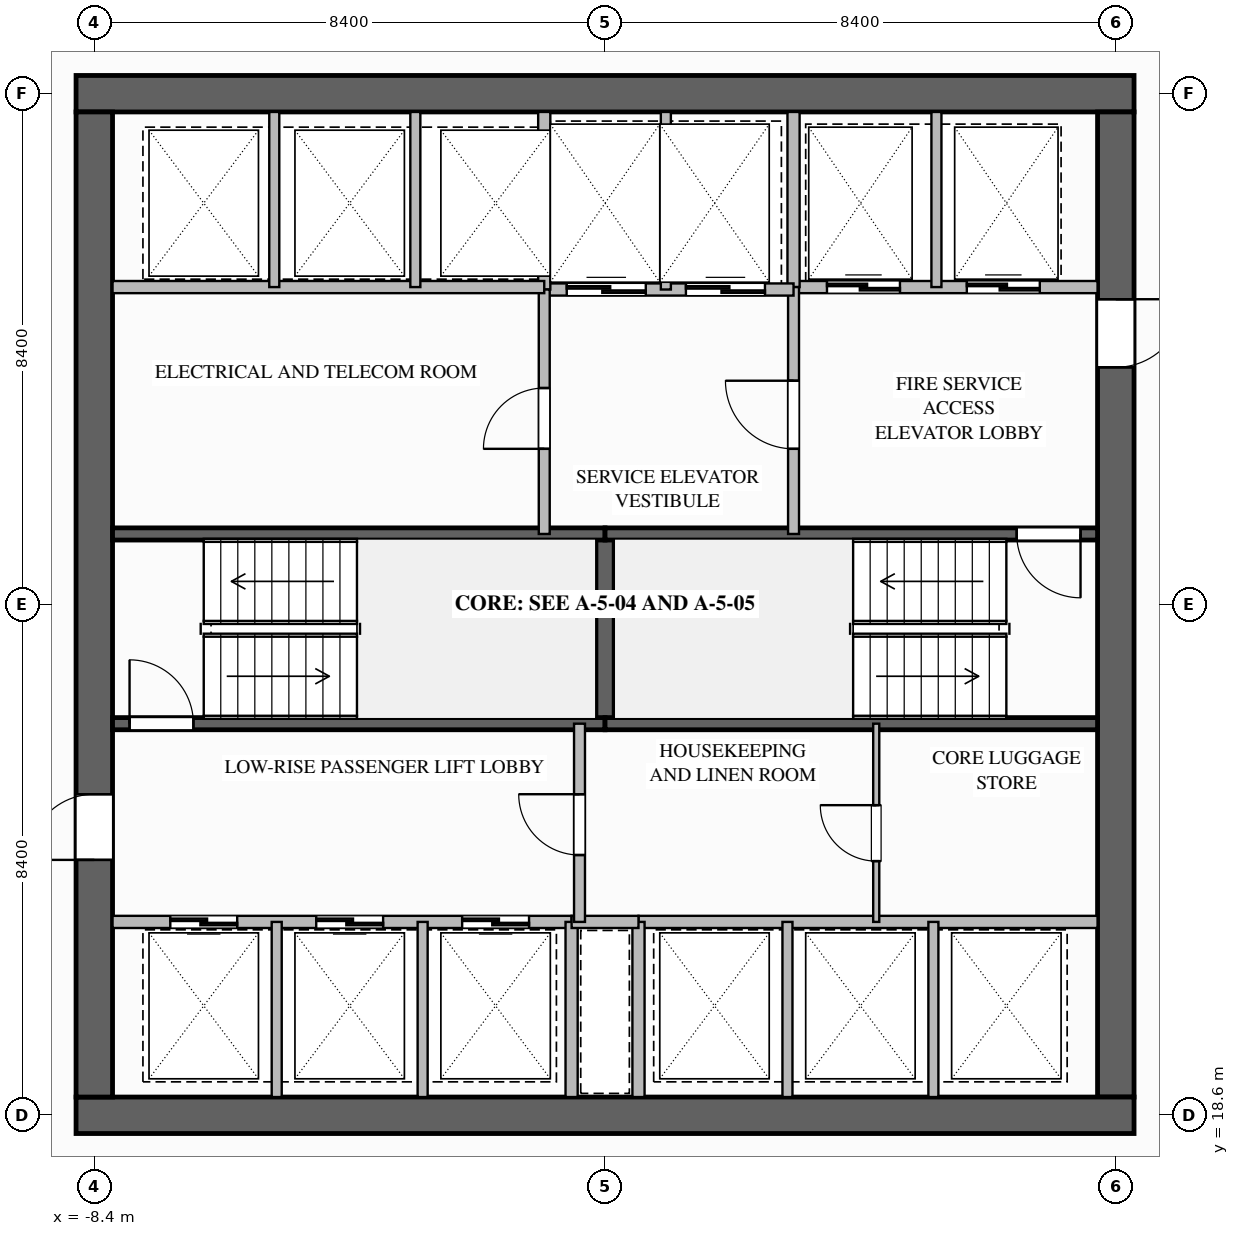
"""IFC4 building model, lengths in metres.
Left out: names, types, materials, properties, quantities, classifications, styles, units other than length and angle.
Written with IfcOpenShell. Run it as: python <this file> out.ifc"""

import sys

from ifc_helpers import new_model, si_unit, direction, frame, frame_2d, origin, place, context, subcontext, project, spatial, rectangle, extrude, element, fill, save


model = new_model("IFC4")
c1 = context("Model", 3, precision=1e-05, world=origin(), true_north=direction((0.0, 1.0)))
c2 = subcontext(c1, "Body", "Model", "MODEL_VIEW")
j1 = project(units=[si_unit("LENGTHUNIT", "METRE"), si_unit("PLANEANGLEUNIT", "RADIAN")], contexts=[c1])
p1 = place(None, origin())
s1 = spatial("IfcSite", under=j1, at=p1, CompositionType="ELEMENT")
p2 = place(p1, origin())
s2 = spatial("IfcBuilding", under=s1, at=p2, CompositionType="ELEMENT")
p3 = place(p2, frame((0.0, 0.0, 75.2)))
s3 = spatial("IfcBuildingStorey", under=s2, at=p3, CompositionType="ELEMENT", Elevation=75.2)
p4 = place(p3, frame((-8.7, 35.4, 0.0), z_axis=(0.0, 0.0, 1.0), x_axis=(1.0, 0.0, 0.0)))
e1 = element("IfcWall", 1, at=p4, inside=s3, PredefinedType="SHEAR", context=c2, shape_type="SweptSolid", body=[
    extrude(rectangle(XDim=17.4, YDim=0.6, at=frame_2d((8.7, 0.0))), origin(), (0.0, 0.0, 1.0), 3.5),
])
p5 = place(p3, frame((8.4, 35.1, 0.0), z_axis=(0.0, 0.0, 1.0), x_axis=(0.0, -1.0, 0.0)))
e2 = element("IfcWall", 2, at=p5, inside=s3, PredefinedType="SHEAR", context=c2, shape_type="SweptSolid", body=[
    extrude(rectangle(XDim=16.2, YDim=0.6, at=frame_2d((8.1, 0.0))), origin(), (0.0, 0.0, 1.0), 3.5),
])
p6 = place(p5, frame((3.08, 0.0, 0.0)))
e3 = element("IfcOpeningElement", 3, at=p6, cuts=e2, PredefinedType="OPENING", context=c2, shape_type="SweptSolid", body=[
    extrude(rectangle(XDim=1.12, YDim=2.1, at=frame_2d((0.56, 1.05))), frame((0.0, 0.31, 0.0), z_axis=(0.0, -1.0, 0.0), x_axis=(1.0, 0.0, 0.0)), (0.0, 0.0, 1.0), 0.62),
])
p7 = place(p3, frame((8.7, 18.6, 0.0), z_axis=(0.0, 0.0, 1.0), x_axis=(-1.0, 0.0, 0.0)))
e4 = element("IfcWall", 4, at=p7, inside=s3, PredefinedType="SHEAR", context=c2, shape_type="SweptSolid", body=[
    extrude(rectangle(XDim=17.4, YDim=0.6, at=frame_2d((8.7, 0.0))), origin(), (0.0, 0.0, 1.0), 3.5),
])
p8 = place(p3, frame((-8.4, 18.9, 0.0), z_axis=(0.0, 0.0, 1.0), x_axis=(0.0, 1.0, 0.0)))
e5 = element("IfcWall", 5, at=p8, inside=s3, PredefinedType="SHEAR", context=c2, shape_type="SweptSolid", body=[
    extrude(rectangle(XDim=16.2, YDim=0.6, at=frame_2d((8.1, 0.0))), origin(), (0.0, 0.0, 1.0), 3.5),
])
p9 = place(p8, frame((3.9, 0.0, 0.0)))
e6 = element("IfcOpeningElement", 6, at=p9, cuts=e5, PredefinedType="OPENING", context=c2, shape_type="SweptSolid", body=[
    extrude(rectangle(XDim=1.08, YDim=2.04, at=frame_2d((0.54, 1.02))), frame((0.0, 0.31, 0.0), z_axis=(0.0, -1.0, 0.0), x_axis=(1.0, 0.0, 0.0)), (0.0, 0.0, 1.0), 0.62),
])
p10 = place(p3, frame((0.0, 25.04, 0.0), z_axis=(0.0, 0.0, 1.0), x_axis=(0.0, 1.0, 0.0)))
e7 = element("IfcWall", 7, at=p10, inside=s3, PredefinedType="SOLIDWALL", context=c2, shape_type="SweptSolid", body=[
    extrude(rectangle(XDim=3.12, YDim=0.3, at=frame_2d((1.56, 0.0))), origin(), (0.0, 0.0, 1.0), 3.24),
])
p11 = place(p3, frame((-8.1, 25.04, 0.0), z_axis=(0.0, 0.0, 1.0), x_axis=(1.0, 0.0, 0.0)))
e8 = element("IfcWall", 8, at=p11, inside=s3, PredefinedType="SOLIDWALL", context=c2, shape_type="SweptSolid", body=[
    extrude(rectangle(XDim=8.1, YDim=0.2, at=frame_2d((4.05, 0.0))), origin(), (0.0, 0.0, 1.0), 3.24),
])
p12 = place(p11, frame((0.28, 0.0, 0.0)))
e9 = element("IfcOpeningElement", 9, at=p12, cuts=e8, PredefinedType="OPENING", context=c2, shape_type="SweptSolid", body=[
    extrude(rectangle(XDim=1.05, YDim=2.1, at=frame_2d((0.525, 1.05))), frame((0.0, 0.11, 0.0), z_axis=(0.0, -1.0, 0.0), x_axis=(1.0, 0.0, 0.0)), (0.0, 0.0, 1.0), 0.22),
])
for number, where, z_axis, x_axis in (
    (10, (-8.1, 28.16, 0.0), (0.0, 0.0, 1.0), (1.0, 0.0, 0.0)),
    (11, (0.0, 25.04, 0.0), (0.0, 0.0, 1.0), (1.0, 0.0, 0.0)),
):
    element("IfcWall", number, at=place(p3, frame(where, z_axis=z_axis, x_axis=x_axis)), inside=s3, PredefinedType="SOLIDWALL", context=c2, shape_type="SweptSolid", body=[
        extrude(rectangle(XDim=8.1, YDim=0.2, at=frame_2d((4.05, 0.0))), origin(), (0.0, 0.0, 1.0), 3.24),
    ])
p13 = place(p3, frame((8.1, 28.16, 0.0), z_axis=(0.0, 0.0, 1.0), x_axis=(-1.0, 0.0, 0.0)))
e12 = element("IfcWall", 12, at=p13, inside=s3, PredefinedType="SOLIDWALL", context=c2, shape_type="SweptSolid", body=[
    extrude(rectangle(XDim=8.1, YDim=0.2, at=frame_2d((4.05, 0.0))), origin(), (0.0, 0.0, 1.0), 3.24),
])
p14 = place(p13, frame((0.28, 0.0, 0.0)))
e13 = element("IfcOpeningElement", 13, at=p14, cuts=e12, PredefinedType="OPENING", context=c2, shape_type="SweptSolid", body=[
    extrude(rectangle(XDim=1.05, YDim=2.1, at=frame_2d((0.525, 1.05))), frame((0.0, 0.11, 0.0), z_axis=(0.0, -1.0, 0.0), x_axis=(1.0, 0.0, 0.0)), (0.0, 0.0, 1.0), 0.22),
])
p15 = place(p3, frame((3.1, 32.22, 0.0), z_axis=(0.0, 0.0, 1.0), x_axis=(1.0, 0.0, 0.0)))
e14 = element("IfcWall", 14, at=p15, inside=s3, PredefinedType="SOLIDWALL", context=c2, shape_type="SweptSolid", body=[
    extrude(rectangle(XDim=5.0, YDim=0.2, at=frame_2d((2.5, 0.0))), origin(), (0.0, 0.0, 1.0), 3.24),
])
p16 = place(p15, frame((0.55, 0.0, 0.0)))
e15 = element("IfcOpeningElement", 15, at=p16, cuts=e14, PredefinedType="OPENING", context=c2, shape_type="SweptSolid", body=[
    extrude(rectangle(XDim=1.2, YDim=2.2, at=frame_2d((0.6, 1.1))), frame((0.0, 0.11, 0.0), z_axis=(0.0, -1.0, 0.0), x_axis=(1.0, 0.0, 0.0)), (0.0, 0.0, 1.0), 0.22),
])
p17 = place(p15, frame((2.85, 0.0, 0.0)))
e16 = element("IfcOpeningElement", 16, at=p17, cuts=e14, PredefinedType="OPENING", context=c2, shape_type="SweptSolid", body=[
    extrude(rectangle(XDim=1.2, YDim=2.2, at=frame_2d((0.6, 1.1))), frame((0.0, 0.11, 0.0), z_axis=(0.0, -1.0, 0.0), x_axis=(1.0, 0.0, 0.0)), (0.0, 0.0, 1.0), 0.22),
])
p18 = place(p3, frame((3.1, 32.22, 0.0), z_axis=(0.0, 0.0, 1.0), x_axis=(0.0, 1.0, 0.0)))
e17 = element("IfcWall", 17, at=p18, inside=s3, PredefinedType="SOLIDWALL", context=c2, shape_type="SweptSolid", body=[
    extrude(rectangle(XDim=2.88, YDim=0.2, at=frame_2d((1.44, 0.0))), origin(), (0.0, 0.0, 1.0), 3.24),
])
p19 = place(p3, frame((5.45, 32.22, 0.0), z_axis=(0.0, 0.0, 1.0), x_axis=(0.0, 1.0, 0.0)))
e18 = element("IfcWall", 18, at=p19, inside=s3, PredefinedType="PARTITIONING", context=c2, shape_type="SweptSolid", body=[
    extrude(rectangle(XDim=2.88, YDim=0.165, at=frame_2d((1.44, 0.0))), origin(), (0.0, 0.0, 1.0), 3.24),
])
p20 = place(p3, frame((3.1, 28.16, 0.0), z_axis=(0.0, 0.0, 1.0), x_axis=(0.0, 1.0, 0.0)))
e19 = element("IfcWall", 19, at=p20, inside=s3, PredefinedType="SOLIDWALL", context=c2, shape_type="SweptSolid", body=[
    extrude(rectangle(XDim=4.06, YDim=0.18, at=frame_2d((2.03, 0.0))), origin(), (0.0, 0.0, 1.0), 3.24),
])
p21 = place(p20, frame((1.4, 0.0, 0.0)))
e20 = element("IfcOpeningElement", 20, at=p21, cuts=e19, PredefinedType="OPENING", context=c2, shape_type="SweptSolid", body=[
    extrude(rectangle(XDim=1.12, YDim=2.1, at=frame_2d((0.56, 1.05))), frame((0.0, 0.1, 0.0), z_axis=(0.0, -1.0, 0.0), x_axis=(1.0, 0.0, 0.0)), (0.0, 0.0, 1.0), 0.2),
])
p22 = place(p3, frame((-1.0, 32.18, 0.0), z_axis=(0.0, 0.0, 1.0), x_axis=(1.0, 0.0, 0.0)))
e21 = element("IfcWall", 21, at=p22, inside=s3, PredefinedType="SOLIDWALL", context=c2, shape_type="SweptSolid", body=[
    extrude(rectangle(XDim=4.1, YDim=0.2, at=frame_2d((2.05, 0.0))), origin(), (0.0, 0.0, 1.0), 3.24),
])
p23 = place(p22, frame((0.37, 0.0, 0.0)))
e22 = element("IfcOpeningElement", 22, at=p23, cuts=e21, PredefinedType="OPENING", context=c2, shape_type="SweptSolid", body=[
    extrude(rectangle(XDim=1.3, YDim=2.2, at=frame_2d((0.65, 1.1))), frame((0.0, 0.11, 0.0), z_axis=(0.0, -1.0, 0.0), x_axis=(1.0, 0.0, 0.0)), (0.0, 0.0, 1.0), 0.22),
])
p24 = place(p22, frame((2.33, 0.0, 0.0)))
e23 = element("IfcOpeningElement", 23, at=p24, cuts=e21, PredefinedType="OPENING", context=c2, shape_type="SweptSolid", body=[
    extrude(rectangle(XDim=1.3, YDim=2.2, at=frame_2d((0.65, 1.1))), frame((0.0, 0.11, 0.0), z_axis=(0.0, -1.0, 0.0), x_axis=(1.0, 0.0, 0.0)), (0.0, 0.0, 1.0), 0.22),
])
p25 = place(p3, frame((-1.0, 32.18, 0.0), z_axis=(0.0, 0.0, 1.0), x_axis=(0.0, 1.0, 0.0)))
e24 = element("IfcWall", 24, at=p25, inside=s3, PredefinedType="SOLIDWALL", context=c2, shape_type="SweptSolid", body=[
    extrude(rectangle(XDim=2.92, YDim=0.2, at=frame_2d((1.46, 0.0))), origin(), (0.0, 0.0, 1.0), 3.24),
])
p26 = place(p3, frame((1.0, 32.18, 0.0), z_axis=(0.0, 0.0, 1.0), x_axis=(0.0, 1.0, 0.0)))
e25 = element("IfcWall", 25, at=p26, inside=s3, PredefinedType="PARTITIONING", context=c2, shape_type="SweptSolid", body=[
    extrude(rectangle(XDim=2.92, YDim=0.165, at=frame_2d((1.46, 0.0))), origin(), (0.0, 0.0, 1.0), 3.24),
])
p27 = place(p3, frame((-1.0, 28.16, 0.0), z_axis=(0.0, 0.0, 1.0), x_axis=(0.0, 1.0, 0.0)))
e26 = element("IfcWall", 26, at=p27, inside=s3, PredefinedType="SOLIDWALL", context=c2, shape_type="SweptSolid", body=[
    extrude(rectangle(XDim=4.02, YDim=0.18, at=frame_2d((2.01, 0.0))), origin(), (0.0, 0.0, 1.0), 3.24),
])
p28 = place(p27, frame((1.4, 0.0, 0.0)))
e27 = element("IfcOpeningElement", 27, at=p28, cuts=e26, PredefinedType="OPENING", context=c2, shape_type="SweptSolid", body=[
    extrude(rectangle(XDim=1.0, YDim=2.1, at=frame_2d((0.5, 1.05))), frame((0.0, 0.1, 0.0), z_axis=(0.0, -1.0, 0.0), x_axis=(1.0, 0.0, 0.0)), (0.0, 0.0, 1.0), 0.2),
])
p29 = place(p3, frame((-8.1, 32.22, 0.0), z_axis=(0.0, 0.0, 1.0), x_axis=(1.0, 0.0, 0.0)))
e28 = element("IfcWall", 28, at=p29, inside=s3, PredefinedType="SOLIDWALL", context=c2, shape_type="SweptSolid", body=[
    extrude(rectangle(XDim=7.1, YDim=0.2, at=frame_2d((3.55, 0.0))), origin(), (0.0, 0.0, 1.0), 3.24),
])
for number, where, z_axis, x_axis in (
    (29, (-5.44, 32.22, 0.0), (0.0, 0.0, 1.0), (0.0, 1.0, 0.0)),
    (30, (-3.12, 32.22, 0.0), (0.0, 0.0, 1.0), (0.0, 1.0, 0.0)),
):
    element("IfcWall", number, at=place(p3, frame(where, z_axis=z_axis, x_axis=x_axis)), inside=s3, PredefinedType="PARTITIONING", context=c2, shape_type="SweptSolid", body=[
        extrude(rectangle(XDim=2.88, YDim=0.165, at=frame_2d((1.44, 0.0))), origin(), (0.0, 0.0, 1.0), 3.24),
    ])
p30 = place(p3, frame((-0.55, 21.78, 0.0), z_axis=(0.0, 0.0, 1.0), x_axis=(-1.0, 0.0, 0.0)))
e31 = element("IfcWall", 31, at=p30, inside=s3, PredefinedType="SOLIDWALL", context=c2, shape_type="SweptSolid", body=[
    extrude(rectangle(XDim=7.55, YDim=0.2, at=frame_2d((3.775, 0.0))), origin(), (0.0, 0.0, 1.0), 3.24),
])
p31 = place(p30, frame((5.5, 0.0, 0.0)))
e32 = element("IfcOpeningElement", 32, at=p31, cuts=e31, PredefinedType="OPENING", context=c2, shape_type="SweptSolid", body=[
    extrude(rectangle(XDim=1.1, YDim=2.2, at=frame_2d((0.55, 1.1))), frame((0.0, 0.11, 0.0), z_axis=(0.0, -1.0, 0.0), x_axis=(1.0, 0.0, 0.0)), (0.0, 0.0, 1.0), 0.22),
])
p32 = place(p30, frame((3.1, 0.0, 0.0)))
e33 = element("IfcOpeningElement", 33, at=p32, cuts=e31, PredefinedType="OPENING", context=c2, shape_type="SweptSolid", body=[
    extrude(rectangle(XDim=1.1, YDim=2.2, at=frame_2d((0.55, 1.1))), frame((0.0, 0.11, 0.0), z_axis=(0.0, -1.0, 0.0), x_axis=(1.0, 0.0, 0.0)), (0.0, 0.0, 1.0), 0.22),
])
p33 = place(p30, frame((0.7, 0.0, 0.0)))
e34 = element("IfcOpeningElement", 34, at=p33, cuts=e31, PredefinedType="OPENING", context=c2, shape_type="SweptSolid", body=[
    extrude(rectangle(XDim=1.1, YDim=2.2, at=frame_2d((0.55, 1.1))), frame((0.0, 0.11, 0.0), z_axis=(0.0, -1.0, 0.0), x_axis=(1.0, 0.0, 0.0)), (0.0, 0.0, 1.0), 0.22),
])
for number, where, z_axis, x_axis in (
    (35, (-5.4, 18.9, 0.0), (0.0, 0.0, 1.0), (0.0, 1.0, 0.0)),
    (36, (-3.0, 18.9, 0.0), (0.0, 0.0, 1.0), (0.0, 1.0, 0.0)),
):
    element("IfcWall", number, at=place(p3, frame(where, z_axis=z_axis, x_axis=x_axis)), inside=s3, PredefinedType="PARTITIONING", context=c2, shape_type="SweptSolid", body=[
        extrude(rectangle(XDim=2.88, YDim=0.165, at=frame_2d((1.44, 0.0))), origin(), (0.0, 0.0, 1.0), 3.24),
    ])
p34 = place(p3, frame((-0.55, 18.9, 0.0), z_axis=(0.0, 0.0, 1.0), x_axis=(0.0, 1.0, 0.0)))
e37 = element("IfcWall", 37, at=p34, inside=s3, PredefinedType="SOLIDWALL", context=c2, shape_type="SweptSolid", body=[
    extrude(rectangle(XDim=2.88, YDim=0.2, at=frame_2d((1.44, 0.0))), origin(), (0.0, 0.0, 1.0), 3.24),
])
p35 = place(p3, frame((8.1, 21.78, 0.0), z_axis=(0.0, 0.0, 1.0), x_axis=(-1.0, 0.0, 0.0)))
e38 = element("IfcWall", 38, at=p35, inside=s3, PredefinedType="SOLIDWALL", context=c2, shape_type="SweptSolid", body=[
    extrude(rectangle(XDim=7.55, YDim=0.2, at=frame_2d((3.775, 0.0))), origin(), (0.0, 0.0, 1.0), 3.24),
])
p36 = place(p3, frame((0.55, 18.9, 0.0), z_axis=(0.0, 0.0, 1.0), x_axis=(0.0, 1.0, 0.0)))
e39 = element("IfcWall", 39, at=p36, inside=s3, PredefinedType="SOLIDWALL", context=c2, shape_type="SweptSolid", body=[
    extrude(rectangle(XDim=2.88, YDim=0.2, at=frame_2d((1.44, 0.0))), origin(), (0.0, 0.0, 1.0), 3.24),
])
for number, where, z_axis, x_axis in (
    (40, (3.0, 18.9, 0.0), (0.0, 0.0, 1.0), (0.0, 1.0, 0.0)),
    (41, (5.4, 18.9, 0.0), (0.0, 0.0, 1.0), (0.0, 1.0, 0.0)),
):
    element("IfcWall", number, at=place(p3, frame(where, z_axis=z_axis, x_axis=x_axis)), inside=s3, PredefinedType="PARTITIONING", context=c2, shape_type="SweptSolid", body=[
        extrude(rectangle(XDim=2.88, YDim=0.165, at=frame_2d((1.44, 0.0))), origin(), (0.0, 0.0, 1.0), 3.24),
    ])
p37 = place(p3, frame((-0.55, 21.78, 0.0), z_axis=(0.0, 0.0, 1.0), x_axis=(1.0, 0.0, 0.0)))
e42 = element("IfcWall", 42, at=p37, inside=s3, PredefinedType="SOLIDWALL", context=c2, shape_type="SweptSolid", body=[
    extrude(rectangle(XDim=1.1, YDim=0.2, at=frame_2d((0.55, 0.0))), origin(), (0.0, 0.0, 1.0), 3.24),
])
p38 = place(p3, frame((-0.42, 21.78, 0.0), z_axis=(0.0, 0.0, 1.0), x_axis=(0.0, 1.0, 0.0)))
e43 = element("IfcWall", 43, at=p38, inside=s3, PredefinedType="SOLIDWALL", context=c2, shape_type="SweptSolid", body=[
    extrude(rectangle(XDim=3.26, YDim=0.18, at=frame_2d((1.63, 0.0))), origin(), (0.0, 0.0, 1.0), 3.24),
])
p39 = place(p38, frame((1.1, 0.0, 0.0)))
e44 = element("IfcOpeningElement", 44, at=p39, cuts=e43, PredefinedType="OPENING", context=c2, shape_type="SweptSolid", body=[
    extrude(rectangle(XDim=1.0, YDim=2.1, at=frame_2d((0.5, 1.05))), frame((0.0, 0.1, 0.0), z_axis=(0.0, -1.0, 0.0), x_axis=(1.0, 0.0, 0.0)), (0.0, 0.0, 1.0), 0.2),
])
p40 = place(p3, frame((4.46, 21.78, 0.0), z_axis=(0.0, 0.0, 1.0), x_axis=(0.0, 1.0, 0.0)))
e45 = element("IfcWall", 45, at=p40, inside=s3, PredefinedType="PARTITIONING", context=c2, shape_type="SweptSolid", body=[
    extrude(rectangle(XDim=3.26, YDim=0.1, at=frame_2d((1.63, 0.0))), origin(), (0.0, 0.0, 1.0), 3.24),
])
p41 = place(p40, frame((1.0, 0.0, 0.0)))
e46 = element("IfcOpeningElement", 46, at=p41, cuts=e45, PredefinedType="OPENING", context=c2, shape_type="SweptSolid", body=[
    extrude(rectangle(XDim=0.92, YDim=2.1, at=frame_2d((0.46, 1.05))), frame((0.0, 0.06, 0.0), z_axis=(0.0, -1.0, 0.0), x_axis=(1.0, 0.0, 0.0)), (0.0, 0.0, 1.0), 0.12),
])
p42 = place(p12, origin())
e47 = element("IfcDoor", 47, at=p42, inside=s3, OperationType="SINGLE_SWING_LEFT", PredefinedType="DOOR", context=c2, shape_type="SweptSolid", body=[
    extrude(rectangle(XDim=1.05, YDim=2.1, at=frame_2d((0.525, 1.05))), frame((0.0, 0.025, 0.0), z_axis=(0.0, -1.0, 0.0), x_axis=(1.0, 0.0, 0.0)), (0.0, 0.0, 1.0), 0.05),
])
fill(e9, e47)
p43 = place(p14, origin())
e48 = element("IfcDoor", 48, at=p43, inside=s3, OperationType="SINGLE_SWING_LEFT", PredefinedType="DOOR", context=c2, shape_type="SweptSolid", body=[
    extrude(rectangle(XDim=1.05, YDim=2.1, at=frame_2d((0.525, 1.05))), frame((0.0, 0.025, 0.0), z_axis=(0.0, -1.0, 0.0), x_axis=(1.0, 0.0, 0.0)), (0.0, 0.0, 1.0), 0.05),
])
fill(e13, e48)
p44 = place(p16, origin())
e49 = element("IfcDoor", 49, at=p44, inside=s3, OperationType="SLIDING_TO_LEFT", PredefinedType="DOOR", context=c2, shape_type="SweptSolid", body=[
    extrude(rectangle(XDim=1.2, YDim=2.2, at=frame_2d((0.6, 1.1))), frame((0.0, 0.025, 0.0), z_axis=(0.0, -1.0, 0.0), x_axis=(1.0, 0.0, 0.0)), (0.0, 0.0, 1.0), 0.05),
])
fill(e15, e49)
p45 = place(p17, origin())
e50 = element("IfcDoor", 50, at=p45, inside=s3, OperationType="SLIDING_TO_LEFT", PredefinedType="DOOR", context=c2, shape_type="SweptSolid", body=[
    extrude(rectangle(XDim=1.2, YDim=2.2, at=frame_2d((0.6, 1.1))), frame((0.0, 0.025, 0.0), z_axis=(0.0, -1.0, 0.0), x_axis=(1.0, 0.0, 0.0)), (0.0, 0.0, 1.0), 0.05),
])
fill(e16, e50)
p46 = place(p21, origin())
e51 = element("IfcDoor", 51, at=p46, inside=s3, OperationType="SINGLE_SWING_RIGHT", PredefinedType="DOOR", context=c2, shape_type="SweptSolid", body=[
    extrude(rectangle(XDim=1.12, YDim=2.1, at=frame_2d((0.56, 1.05))), frame((0.0, 0.025, 0.0), z_axis=(0.0, -1.0, 0.0), x_axis=(1.0, 0.0, 0.0)), (0.0, 0.0, 1.0), 0.05),
])
fill(e20, e51)
p47 = place(p6, origin())
e52 = element("IfcDoor", 52, at=p47, inside=s3, OperationType="SINGLE_SWING_LEFT", PredefinedType="DOOR", context=c2, shape_type="SweptSolid", body=[
    extrude(rectangle(XDim=1.12, YDim=2.1, at=frame_2d((0.56, 1.05))), frame((0.0, 0.025, 0.0), z_axis=(0.0, -1.0, 0.0), x_axis=(1.0, 0.0, 0.0)), (0.0, 0.0, 1.0), 0.05),
])
fill(e3, e52)
p48 = place(p23, origin())
e53 = element("IfcDoor", 53, at=p48, inside=s3, OperationType="SLIDING_TO_LEFT", PredefinedType="DOOR", context=c2, shape_type="SweptSolid", body=[
    extrude(rectangle(XDim=1.3, YDim=2.2, at=frame_2d((0.65, 1.1))), frame((0.0, 0.025, 0.0), z_axis=(0.0, -1.0, 0.0), x_axis=(1.0, 0.0, 0.0)), (0.0, 0.0, 1.0), 0.05),
])
fill(e22, e53)
p49 = place(p24, origin())
e54 = element("IfcDoor", 54, at=p49, inside=s3, OperationType="SLIDING_TO_LEFT", PredefinedType="DOOR", context=c2, shape_type="SweptSolid", body=[
    extrude(rectangle(XDim=1.3, YDim=2.2, at=frame_2d((0.65, 1.1))), frame((0.0, 0.025, 0.0), z_axis=(0.0, -1.0, 0.0), x_axis=(1.0, 0.0, 0.0)), (0.0, 0.0, 1.0), 0.05),
])
fill(e23, e54)
p50 = place(p28, origin())
e55 = element("IfcDoor", 55, at=p50, inside=s3, OperationType="SINGLE_SWING_LEFT", PredefinedType="DOOR", context=c2, shape_type="SweptSolid", body=[
    extrude(rectangle(XDim=1.0, YDim=2.1, at=frame_2d((0.5, 1.05))), frame((0.0, 0.025, 0.0), z_axis=(0.0, -1.0, 0.0), x_axis=(1.0, 0.0, 0.0)), (0.0, 0.0, 1.0), 0.05),
])
fill(e27, e55)
p51 = place(p31, origin())
e56 = element("IfcDoor", 56, at=p51, inside=s3, OperationType="SLIDING_TO_LEFT", PredefinedType="DOOR", context=c2, shape_type="SweptSolid", body=[
    extrude(rectangle(XDim=1.1, YDim=2.2, at=frame_2d((0.55, 1.1))), frame((0.0, 0.025, 0.0), z_axis=(0.0, -1.0, 0.0), x_axis=(1.0, 0.0, 0.0)), (0.0, 0.0, 1.0), 0.05),
])
fill(e32, e56)
p52 = place(p32, origin())
e57 = element("IfcDoor", 57, at=p52, inside=s3, OperationType="SLIDING_TO_LEFT", PredefinedType="DOOR", context=c2, shape_type="SweptSolid", body=[
    extrude(rectangle(XDim=1.1, YDim=2.2, at=frame_2d((0.55, 1.1))), frame((0.0, 0.025, 0.0), z_axis=(0.0, -1.0, 0.0), x_axis=(1.0, 0.0, 0.0)), (0.0, 0.0, 1.0), 0.05),
])
fill(e33, e57)
p53 = place(p33, origin())
e58 = element("IfcDoor", 58, at=p53, inside=s3, OperationType="SLIDING_TO_LEFT", PredefinedType="DOOR", context=c2, shape_type="SweptSolid", body=[
    extrude(rectangle(XDim=1.1, YDim=2.2, at=frame_2d((0.55, 1.1))), frame((0.0, 0.025, 0.0), z_axis=(0.0, -1.0, 0.0), x_axis=(1.0, 0.0, 0.0)), (0.0, 0.0, 1.0), 0.05),
])
fill(e34, e58)
p54 = place(p39, origin())
e59 = element("IfcDoor", 59, at=p54, inside=s3, OperationType="SINGLE_SWING_RIGHT", PredefinedType="DOOR", context=c2, shape_type="SweptSolid", body=[
    extrude(rectangle(XDim=1.0, YDim=2.1, at=frame_2d((0.5, 1.05))), frame((0.0, 0.025, 0.0), z_axis=(0.0, -1.0, 0.0), x_axis=(1.0, 0.0, 0.0)), (0.0, 0.0, 1.0), 0.05),
])
fill(e44, e59)
p55 = place(p9, origin())
e60 = element("IfcDoor", 60, at=p55, inside=s3, OperationType="SINGLE_SWING_LEFT", PredefinedType="DOOR", context=c2, shape_type="SweptSolid", body=[
    extrude(rectangle(XDim=1.08, YDim=2.04, at=frame_2d((0.54, 1.02))), frame((0.0, 0.025, 0.0), z_axis=(0.0, -1.0, 0.0), x_axis=(1.0, 0.0, 0.0)), (0.0, 0.0, 1.0), 0.05),
])
fill(e6, e60)
p56 = place(p41, origin())
e61 = element("IfcDoor", 61, at=p56, inside=s3, OperationType="SINGLE_SWING_RIGHT", PredefinedType="DOOR", context=c2, shape_type="SweptSolid", body=[
    extrude(rectangle(XDim=0.92, YDim=2.1, at=frame_2d((0.46, 1.05))), frame((0.0, 0.025, 0.0), z_axis=(0.0, -1.0, 0.0), x_axis=(1.0, 0.0, 0.0)), (0.0, 0.0, 1.0), 0.05),
])
fill(e46, e61)
save(model, sys.argv[1])
